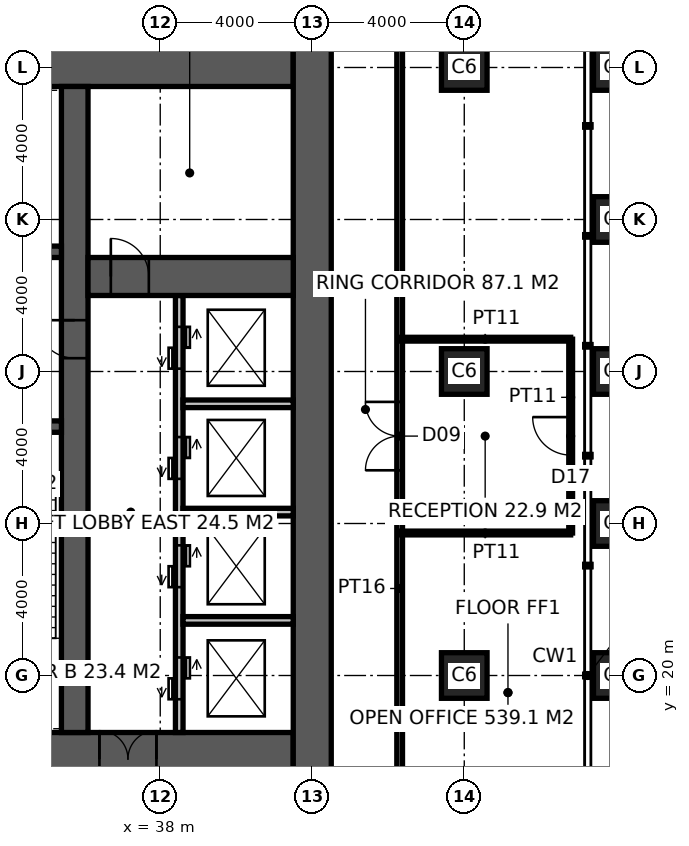
"""IFC4 building model, lengths in metres.
Left out: names, types, materials, properties, quantities, classifications, styles, units other than length and angle.
Written with IfcOpenShell. Run it as: python <this file> out.ifc"""

import sys

from ifc_helpers import new_model, si_unit, direction, frame, frame_2d, origin, origin_2d, place, context, subcontext, project, spatial, rectangle, hollow_rectangle, extrude, element, fill, save


model = new_model("IFC4")
c1 = context("Model", 3, precision=1e-05, world=origin(), true_north=direction((0.0, 1.0)))
c2 = subcontext(c1, "Body", "Model", "MODEL_VIEW")
j1 = project(units=[si_unit("LENGTHUNIT", "METRE"), si_unit("PLANEANGLEUNIT", "RADIAN")], contexts=[c1])
p1 = place(None, origin())
s1 = spatial("IfcSite", under=j1, at=p1, CompositionType="ELEMENT")
p2 = place(p1, origin())
s2 = spatial("IfcBuilding", under=s1, at=p2, CompositionType="ELEMENT")
p3 = place(p2, frame((0.0, 0.0, 6.0)))
s3 = spatial("IfcBuildingStorey", under=s2, at=p3, CompositionType="ELEMENT", Elevation=6.0)
for number, where, z_axis, x_axis in (
    (1, (50.0, 20.0, 0.0), (0.0, 0.0, 1.0), (1.0, 0.0, 0.0)),
    (2, (50.0, 24.0, 0.0), (0.0, 0.0, 1.0), (1.0, 0.0, 0.0)),
    (3, (50.0, 28.0, 0.0), (0.0, 0.0, 1.0), (1.0, 0.0, 0.0)),
    (4, (50.0, 32.0, 0.0), (0.0, 0.0, 1.0), (1.0, 0.0, 0.0)),
    (5, (50.0, 36.0, 0.0), (0.0, 0.0, 1.0), (1.0, 0.0, 0.0)),
    (6, (46.0, 20.0, 0.0), (0.0, 0.0, 1.0), (1.0, 0.0, 0.0)),
    (7, (46.0, 28.0, 0.0), (0.0, 0.0, 1.0), (1.0, 0.0, 0.0)),
    (8, (46.0, 36.0, 0.0), (0.0, 0.0, 1.0), (1.0, 0.0, 0.0)),
):
    element("IfcColumn", number, at=place(p3, frame(where, z_axis=z_axis, x_axis=x_axis)), inside=s3, PredefinedType="COLUMN", context=c2, shape_type="SweptSolid", body=[
        extrude(hollow_rectangle(XDim=1.2, YDim=1.2, WallThickness=0.125, at=origin_2d()), origin(), (0.0, 0.0, 1.0), 5.0),
    ])
p4 = place(p3, frame((18.5, 17.8, -0.15), z_axis=(0.0, 0.0, 1.0), x_axis=(1.0, 0.0, 0.0)))
e9 = element("IfcWall", 9, at=p4, inside=s3, PredefinedType="SHEAR", context=c2, shape_type="SweptSolid", body=[
    extrude(rectangle(XDim=23.0, YDim=1.4, at=frame_2d((11.5, 0.0))), origin(), (0.0, 0.0, 1.0), 5.0),
])
p5 = place(p4, frame((3.45, 0.0, 0.15)))
e10 = element("IfcOpeningElement", 10, at=p5, cuts=e9, PredefinedType="OPENING", context=c2, shape_type="SweptSolid", body=[
    extrude(rectangle(XDim=1.5, YDim=2.4, at=frame_2d((0.75, 1.2))), frame((0.0, 0.71, 0.0), z_axis=(0.0, -1.0, 0.0), x_axis=(1.0, 0.0, 0.0)), (0.0, 0.0, 1.0), 1.42),
])
p6 = place(p4, frame((17.9, 0.0, 0.15)))
e11 = element("IfcOpeningElement", 11, at=p6, cuts=e9, PredefinedType="OPENING", context=c2, shape_type="SweptSolid", body=[
    extrude(rectangle(XDim=1.5, YDim=2.4, at=frame_2d((0.75, 1.2))), frame((0.0, 0.71, 0.0), z_axis=(0.0, -1.0, 0.0), x_axis=(1.0, 0.0, 0.0)), (0.0, 0.0, 1.0), 1.42),
])
p7 = place(p4, frame((0.9, 0.0, 0.15)))
e12 = element("IfcOpeningElement", 12, at=p7, cuts=e9, PredefinedType="OPENING", context=c2, shape_type="SweptSolid", body=[
    extrude(rectangle(XDim=1.0, YDim=2.2, at=frame_2d((0.5, 1.1))), frame((0.0, 0.71, 0.0), z_axis=(0.0, -1.0, 0.0), x_axis=(1.0, 0.0, 0.0)), (0.0, 0.0, 1.0), 1.42),
])
p8 = place(p3, frame((18.5, 36.2, -0.15), z_axis=(0.0, 0.0, 1.0), x_axis=(1.0, 0.0, 0.0)))
e13 = element("IfcWall", 13, at=p8, inside=s3, PredefinedType="SHEAR", context=c2, shape_type="SweptSolid", body=[
    extrude(rectangle(XDim=23.0, YDim=1.4, at=frame_2d((11.5, 0.0))), origin(), (0.0, 0.0, 1.0), 5.0),
])
p9 = place(p3, frame((42.0, 17.1, -0.15), z_axis=(0.0, 0.0, 1.0), x_axis=(0.0, 1.0, 0.0)))
e14 = element("IfcWall", 14, at=p9, inside=s3, PredefinedType="SHEAR", context=c2, shape_type="SweptSolid", body=[
    extrude(rectangle(XDim=19.8, YDim=1.0, at=frame_2d((9.9, 0.0))), origin(), (0.0, 0.0, 1.0), 5.0),
])
p10 = place(p3, frame((35.75, 18.5, -0.15), z_axis=(0.0, 0.0, 1.0), x_axis=(0.0, 1.0, 0.0)))
e15 = element("IfcWall", 15, at=p10, inside=s3, PredefinedType="SHEAR", context=c2, shape_type="SweptSolid", body=[
    extrude(rectangle(XDim=17.0, YDim=0.7, at=frame_2d((8.5, 0.0))), origin(), (0.0, 0.0, 1.0), 5.0),
])
p11 = place(p10, frame((9.85, 0.0, 0.15)))
e16 = element("IfcOpeningElement", 16, at=p11, cuts=e15, PredefinedType="OPENING", context=c2, shape_type="SweptSolid", body=[
    extrude(rectangle(XDim=1.0, YDim=2.2, at=frame_2d((0.5, 1.1))), frame((0.0, 0.36, 0.0), z_axis=(0.0, -1.0, 0.0), x_axis=(1.0, 0.0, 0.0)), (0.0, 0.0, 1.0), 0.72),
])
p12 = place(p3, frame((24.15, 26.55, -0.15), z_axis=(0.0, 0.0, 1.0), x_axis=(1.0, 0.0, 0.0)))
e17 = element("IfcWall", 17, at=p12, inside=s3, PredefinedType="SHEAR", context=c2, shape_type="SweptSolid", body=[
    extrude(rectangle(XDim=11.25, YDim=0.3, at=frame_2d((5.625, 0.0))), origin(), (0.0, 0.0, 1.0), 5.0),
])
p13 = place(p12, frame((9.25, 0.0, 0.15)))
e18 = element("IfcOpeningElement", 18, at=p13, cuts=e17, PredefinedType="OPENING", context=c2, shape_type="SweptSolid", body=[
    extrude(rectangle(XDim=1.0, YDim=2.2, at=frame_2d((0.5, 1.1))), frame((0.0, 0.16, 0.0), z_axis=(0.0, -1.0, 0.0), x_axis=(1.0, 0.0, 0.0)), (0.0, 0.0, 1.0), 0.32),
])
p14 = place(p12, frame((4.9, 0.0, 0.15)))
e19 = element("IfcOpeningElement", 19, at=p14, cuts=e17, PredefinedType="OPENING", context=c2, shape_type="SweptSolid", body=[
    extrude(rectangle(XDim=1.5, YDim=2.4, at=frame_2d((0.75, 1.2))), frame((0.0, 0.16, 0.0), z_axis=(0.0, -1.0, 0.0), x_axis=(1.0, 0.0, 0.0)), (0.0, 0.0, 1.0), 0.32),
])
p15 = place(p3, frame((24.15, 31.15, -0.15), z_axis=(0.0, 0.0, 1.0), x_axis=(1.0, 0.0, 0.0)))
e20 = element("IfcWall", 20, at=p15, inside=s3, PredefinedType="SHEAR", context=c2, shape_type="SweptSolid", body=[
    extrude(rectangle(XDim=11.25, YDim=0.3, at=frame_2d((5.625, 0.0))), origin(), (0.0, 0.0, 1.0), 5.0),
])
p16 = place(p15, frame((7.25, 0.0, 0.15)))
e21 = element("IfcOpeningElement", 21, at=p16, cuts=e20, PredefinedType="OPENING", context=c2, shape_type="SweptSolid", body=[
    extrude(rectangle(XDim=1.4, YDim=2.4, at=frame_2d((0.7, 1.2))), frame((0.0, 0.16, 0.0), z_axis=(0.0, -1.0, 0.0), x_axis=(1.0, 0.0, 0.0)), (0.0, 0.0, 1.0), 0.32),
])
p17 = place(p3, frame((38.5, 18.5, -0.15), z_axis=(0.0, 0.0, 1.0), x_axis=(0.0, 1.0, 0.0)))
e22 = element("IfcWall", 22, at=p17, inside=s3, PredefinedType="SOLIDWALL", context=c2, shape_type="SweptSolid", body=[
    extrude(rectangle(XDim=11.5, YDim=0.2, at=frame_2d((5.75, 0.0))), origin(), (0.0, 0.0, 1.0), 5.0),
])
p18 = place(p17, frame((0.875, 0.0, 0.15)))
e23 = element("IfcOpeningElement", 23, at=p18, cuts=e22, PredefinedType="OPENING", context=c2, shape_type="SweptSolid", body=[
    extrude(rectangle(XDim=1.1, YDim=2.2, at=frame_2d((0.55, 1.1))), frame((0.0, 0.11, 0.0), z_axis=(0.0, -1.0, 0.0), x_axis=(1.0, 0.0, 0.0)), (0.0, 0.0, 1.0), 0.22),
])
p19 = place(p17, frame((3.825, 0.0, 0.15)))
e24 = element("IfcOpeningElement", 24, at=p19, cuts=e22, PredefinedType="OPENING", context=c2, shape_type="SweptSolid", body=[
    extrude(rectangle(XDim=1.1, YDim=2.2, at=frame_2d((0.55, 1.1))), frame((0.0, 0.11, 0.0), z_axis=(0.0, -1.0, 0.0), x_axis=(1.0, 0.0, 0.0)), (0.0, 0.0, 1.0), 0.22),
])
p20 = place(p17, frame((6.675, 0.0, 0.15)))
e25 = element("IfcOpeningElement", 25, at=p20, cuts=e22, PredefinedType="OPENING", context=c2, shape_type="SweptSolid", body=[
    extrude(rectangle(XDim=1.1, YDim=2.2, at=frame_2d((0.55, 1.1))), frame((0.0, 0.11, 0.0), z_axis=(0.0, -1.0, 0.0), x_axis=(1.0, 0.0, 0.0)), (0.0, 0.0, 1.0), 0.22),
])
p21 = place(p17, frame((9.575, 0.0, 0.15)))
e26 = element("IfcOpeningElement", 26, at=p21, cuts=e22, PredefinedType="OPENING", context=c2, shape_type="SweptSolid", body=[
    extrude(rectangle(XDim=1.1, YDim=2.2, at=frame_2d((0.55, 1.1))), frame((0.0, 0.11, 0.0), z_axis=(0.0, -1.0, 0.0), x_axis=(1.0, 0.0, 0.0)), (0.0, 0.0, 1.0), 0.22),
])
p22 = place(p3, frame((36.1, 30.5, -0.15), z_axis=(0.0, 0.0, 1.0), x_axis=(1.0, 0.0, 0.0)))
e27 = element("IfcWall", 27, at=p22, inside=s3, PredefinedType="SHEAR", context=c2, shape_type="SweptSolid", body=[
    extrude(rectangle(XDim=5.4, YDim=1.0, at=frame_2d((2.7, 0.0))), origin(), (0.0, 0.0, 1.0), 5.0),
])
p23 = place(p22, frame((0.6, 0.0, 0.15)))
e28 = element("IfcOpeningElement", 28, at=p23, cuts=e27, PredefinedType="OPENING", context=c2, shape_type="SweptSolid", body=[
    extrude(rectangle(XDim=1.0, YDim=2.2, at=frame_2d((0.5, 1.1))), frame((0.0, 0.51, 0.0), z_axis=(0.0, -1.0, 0.0), x_axis=(1.0, 0.0, 0.0)), (0.0, 0.0, 1.0), 1.02),
])
for number, where, z_axis, x_axis in (
    (29, (38.6, 21.45, -0.15), (0.0, 0.0, 1.0), (1.0, 0.0, 0.0)),
    (30, (38.6, 24.3, -0.15), (0.0, 0.0, 1.0), (1.0, 0.0, 0.0)),
    (31, (38.6, 27.15, -0.15), (0.0, 0.0, 1.0), (1.0, 0.0, 0.0)),
):
    element("IfcWall", number, at=place(p3, frame(where, z_axis=z_axis, x_axis=x_axis)), inside=s3, PredefinedType="SOLIDWALL", context=c2, shape_type="SweptSolid", body=[
        extrude(rectangle(XDim=2.9, YDim=0.2, at=frame_2d((1.45, 0.0))), origin(), (0.0, 0.0, 1.0), 5.0),
    ])
p24 = place(p3, frame((44.3, 15.225, 0.0), z_axis=(0.0, 0.0, 1.0), x_axis=(0.0, 1.0, 0.0)))
e32 = element("IfcWall", 32, at=p24, inside=s3, PredefinedType="PARTITIONING", context=c2, shape_type="SweptSolid", body=[
    extrude(rectangle(XDim=23.55, YDim=0.15, at=frame_2d((11.775, 0.0))), origin(), (0.0, 0.0, 1.0), 4.85),
])
p25 = place(p24, frame((10.175, 0.0, 0.0)))
e33 = element("IfcOpeningElement", 33, at=p25, cuts=e32, PredefinedType="OPENING", context=c2, shape_type="SweptSolid", body=[
    extrude(rectangle(XDim=1.8, YDim=2.4, at=frame_2d((0.9, 1.2))), frame((0.0, 0.085, 0.0), z_axis=(0.0, -1.0, 0.0), x_axis=(1.0, 0.0, 0.0)), (0.0, 0.0, 1.0), 0.17),
])
p26 = place(p3, frame((44.3, 23.75, 0.0), z_axis=(0.0, 0.0, 1.0), x_axis=(1.0, 0.0, 0.0)))
e34 = element("IfcWall", 34, at=p26, inside=s3, PredefinedType="PARTITIONING", context=c2, shape_type="SweptSolid", body=[
    extrude(rectangle(XDim=4.5, YDim=0.1, at=frame_2d((2.25, 0.0))), origin(), (0.0, 0.0, 1.0), 3.65),
])
p27 = place(p3, frame((48.8, 23.75, 0.0), z_axis=(0.0, 0.0, 1.0), x_axis=(0.0, 1.0, 0.0)))
e35 = element("IfcWall", 35, at=p27, inside=s3, PredefinedType="PARTITIONING", context=c2, shape_type="SweptSolid", body=[
    extrude(rectangle(XDim=5.1, YDim=0.1, at=frame_2d((2.55, 0.0))), origin(), (0.0, 0.0, 1.0), 4.85),
])
p28 = place(p27, frame((2.05, 0.0, 0.0)))
e36 = element("IfcOpeningElement", 36, at=p28, cuts=e35, PredefinedType="OPENING", context=c2, shape_type="SweptSolid", body=[
    extrude(rectangle(XDim=1.0, YDim=2.2, at=frame_2d((0.5, 1.1))), frame((0.0, 0.06, 0.0), z_axis=(0.0, -1.0, 0.0), x_axis=(1.0, 0.0, 0.0)), (0.0, 0.0, 1.0), 0.12),
])
p29 = place(p3, frame((48.8, 28.85, 0.0), z_axis=(0.0, 0.0, 1.0), x_axis=(-1.0, 0.0, 0.0)))
e37 = element("IfcWall", 37, at=p29, inside=s3, PredefinedType="PARTITIONING", context=c2, shape_type="SweptSolid", body=[
    extrude(rectangle(XDim=4.5, YDim=0.1, at=frame_2d((2.25, 0.0))), origin(), (0.0, 0.0, 1.0), 4.85),
])
p30 = place(p11, origin())
e38 = element("IfcDoor", 38, at=p30, inside=s3, OperationType="SINGLE_SWING_RIGHT", PredefinedType="DOOR", context=c2, shape_type="SweptSolid", body=[
    extrude(rectangle(XDim=1.0, YDim=2.2, at=frame_2d((0.5, 1.1))), frame((0.0, 0.025, 0.0), z_axis=(0.0, -1.0, 0.0), x_axis=(1.0, 0.0, 0.0)), (0.0, 0.0, 1.0), 0.05),
])
fill(e16, e38)
p31 = place(p6, origin())
e39 = element("IfcDoor", 39, at=p31, inside=s3, OperationType="DOUBLE_DOOR_DOUBLE_SWING", PredefinedType="DOOR", context=c2, shape_type="SweptSolid", body=[
    extrude(rectangle(XDim=1.5, YDim=2.4, at=frame_2d((0.75, 1.2))), frame((0.0, 0.025, 0.0), z_axis=(0.0, -1.0, 0.0), x_axis=(1.0, 0.0, 0.0)), (0.0, 0.0, 1.0), 0.05),
])
fill(e11, e39)
p32 = place(p23, origin())
e40 = element("IfcDoor", 40, at=p32, inside=s3, OperationType="SINGLE_SWING_LEFT", PredefinedType="DOOR", context=c2, shape_type="SweptSolid", body=[
    extrude(rectangle(XDim=1.0, YDim=2.2, at=frame_2d((0.5, 1.1))), frame((0.0, 0.025, 0.0), z_axis=(0.0, -1.0, 0.0), x_axis=(1.0, 0.0, 0.0)), (0.0, 0.0, 1.0), 0.05),
])
fill(e28, e40)
p33 = place(p25, origin())
e41 = element("IfcDoor", 41, at=p33, inside=s3, OperationType="DOUBLE_DOOR_DOUBLE_SWING", PredefinedType="DOOR", context=c2, shape_type="SweptSolid", body=[
    extrude(rectangle(XDim=1.8, YDim=2.4, at=frame_2d((0.9, 1.2))), frame((0.0, 0.025, 0.0), z_axis=(0.0, -1.0, 0.0), x_axis=(1.0, 0.0, 0.0)), (0.0, 0.0, 1.0), 0.05),
])
fill(e33, e41)
p34 = place(p28, origin())
e42 = element("IfcDoor", 42, at=p34, inside=s3, OperationType="SINGLE_SWING_RIGHT", PredefinedType="DOOR", context=c2, shape_type="SweptSolid", body=[
    extrude(rectangle(XDim=1.0, YDim=2.2, at=frame_2d((0.5, 1.1))), frame((0.0, 0.025, 0.0), z_axis=(0.0, -1.0, 0.0), x_axis=(1.0, 0.0, 0.0)), (0.0, 0.0, 1.0), 0.05),
])
fill(e36, e42)
p35 = place(p18, origin())
e43 = element("IfcDoor", 43, at=p35, inside=s3, OperationType="DOUBLE_DOOR_SLIDING", PredefinedType="DOOR", context=c2, shape_type="SweptSolid", body=[
    extrude(rectangle(XDim=1.1, YDim=2.2, at=frame_2d((0.55, 1.1))), frame((0.0, 0.025, 0.0), z_axis=(0.0, -1.0, 0.0), x_axis=(1.0, 0.0, 0.0)), (0.0, 0.0, 1.0), 0.05),
])
fill(e23, e43)
p36 = place(p19, origin())
e44 = element("IfcDoor", 44, at=p36, inside=s3, OperationType="DOUBLE_DOOR_SLIDING", PredefinedType="DOOR", context=c2, shape_type="SweptSolid", body=[
    extrude(rectangle(XDim=1.1, YDim=2.2, at=frame_2d((0.55, 1.1))), frame((0.0, 0.025, 0.0), z_axis=(0.0, -1.0, 0.0), x_axis=(1.0, 0.0, 0.0)), (0.0, 0.0, 1.0), 0.05),
])
fill(e24, e44)
p37 = place(p20, origin())
e45 = element("IfcDoor", 45, at=p37, inside=s3, OperationType="DOUBLE_DOOR_SLIDING", PredefinedType="DOOR", context=c2, shape_type="SweptSolid", body=[
    extrude(rectangle(XDim=1.1, YDim=2.2, at=frame_2d((0.55, 1.1))), frame((0.0, 0.025, 0.0), z_axis=(0.0, -1.0, 0.0), x_axis=(1.0, 0.0, 0.0)), (0.0, 0.0, 1.0), 0.05),
])
fill(e25, e45)
p38 = place(p21, origin())
e46 = element("IfcDoor", 46, at=p38, inside=s3, OperationType="DOUBLE_DOOR_SLIDING", PredefinedType="DOOR", context=c2, shape_type="SweptSolid", body=[
    extrude(rectangle(XDim=1.1, YDim=2.2, at=frame_2d((0.55, 1.1))), frame((0.0, 0.025, 0.0), z_axis=(0.0, -1.0, 0.0), x_axis=(1.0, 0.0, 0.0)), (0.0, 0.0, 1.0), 0.05),
])
fill(e26, e46)
save(model, sys.argv[1])
